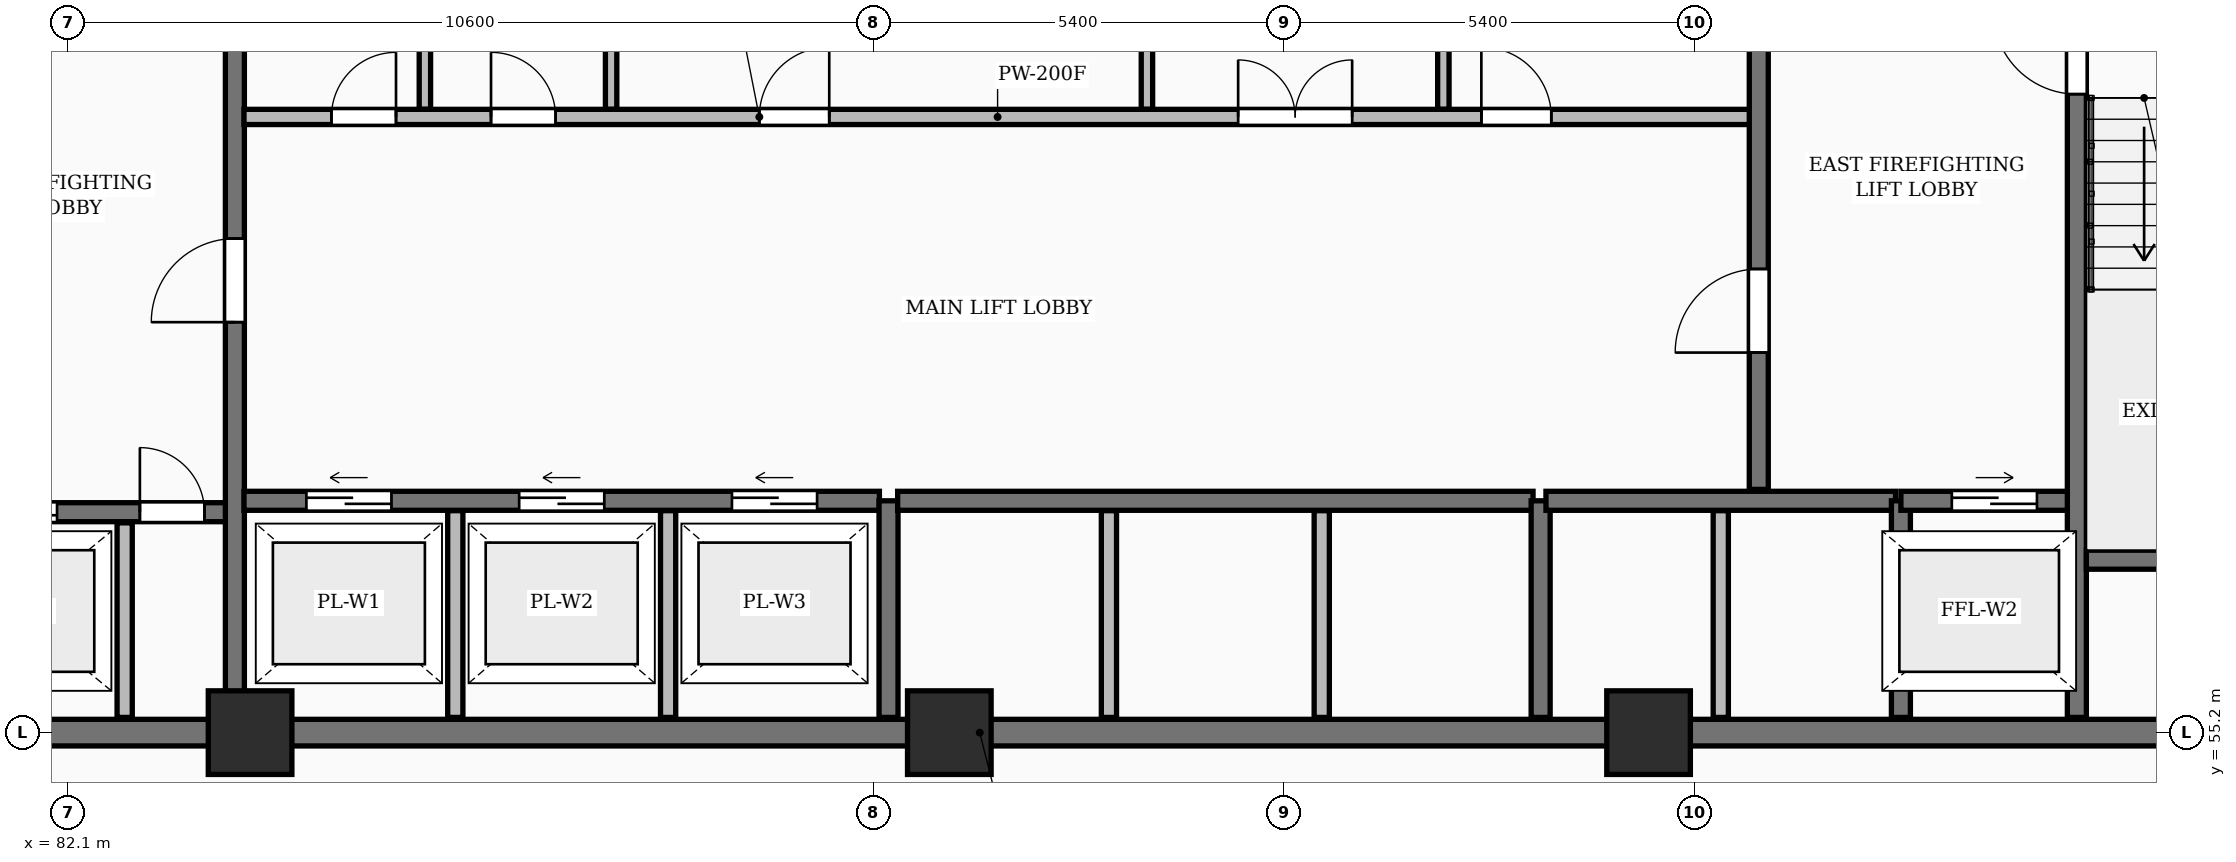
"""IFC4 building model, lengths in metres.
Left out: names, types, materials, properties, quantities, classifications, styles, units other than length and angle.
Written with IfcOpenShell. Run it as: python <this file> out.ifc"""

import sys

from ifc_helpers import new_model, si_unit, direction, frame, frame_2d, origin, origin_2d, place, context, subcontext, project, spatial, rectangle, extrude, element, fill, save


model = new_model("IFC4")
c1 = context("Model", 3, precision=1e-05, world=origin(), true_north=direction((0.0, 1.0)))
c2 = subcontext(c1, "Body", "Model", "MODEL_VIEW")
j1 = project(units=[si_unit("LENGTHUNIT", "METRE"), si_unit("PLANEANGLEUNIT", "RADIAN")], contexts=[c1])
p1 = place(None, origin())
s1 = spatial("IfcSite", under=j1, at=p1, CompositionType="ELEMENT")
p2 = place(p1, origin())
s2 = spatial("IfcBuilding", under=s1, at=p2, CompositionType="ELEMENT")
p3 = place(p2, frame((0.0, 0.0, -10.8)))
s3 = spatial("IfcBuildingStorey", under=s2, at=p3, CompositionType="ELEMENT", Elevation=-10.8)
for number, where, z_axis, x_axis in (
    (1, (84.5, 55.2, -0.45), (0.0, 0.0, 1.0), (1.0, 0.0, 0.0)),
    (2, (93.7, 55.2, -0.45), (0.0, 0.0, 1.0), (1.0, 0.0, 0.0)),
    (3, (102.9, 55.2, -0.45), (0.0, 0.0, 1.0), (1.0, 0.0, 0.0)),
):
    element("IfcColumn", number, at=place(p3, frame(where, z_axis=z_axis, x_axis=x_axis)), inside=s3, PredefinedType="COLUMN", context=c2, shape_type="SweptSolid", body=[
        extrude(rectangle(XDim=1.1, YDim=1.1, at=origin_2d()), origin(), (0.0, 0.0, 1.0), 4.05),
    ])
p4 = place(p3, frame((75.95, 55.2, 0.0), z_axis=(0.0, 0.0, 1.0), x_axis=(1.0, 0.0, 0.0)))
e4 = element("IfcWall", 4, at=p4, inside=s3, PredefinedType="SHEAR", context=c2, shape_type="SweptSolid", body=[
    extrude(rectangle(XDim=36.3, YDim=0.35, at=frame_2d((18.15, 0.0))), origin(), (0.0, 0.0, 1.0), 3.6),
])
p5 = place(p3, frame((79.79, 58.1, 0.0), z_axis=(0.0, 0.0, 1.0), x_axis=(1.0, 0.0, 0.0)))
e5 = element("IfcWall", 5, at=p5, inside=s3, PredefinedType="SHEAR", context=c2, shape_type="SweptSolid", body=[
    extrude(rectangle(XDim=4.39, YDim=0.25, at=frame_2d((2.195, 0.0))), origin(), (0.0, 0.0, 1.0), 3.6),
])
p6 = place(p5, frame((1.05, 0.0, 0.0)))
e6 = element("IfcOpeningElement", 6, at=p6, cuts=e5, PredefinedType="OPENING", context=c2, shape_type="SweptSolid", body=[
    extrude(rectangle(XDim=1.12, YDim=2.12, at=frame_2d((0.56, 1.06))), frame((0.0, 0.135, 0.0), z_axis=(0.0, -1.0, 0.0), x_axis=(1.0, 0.0, 0.0)), (0.0, 0.0, 1.0), 0.27),
])
p7 = place(p5, frame((3.26, 0.0, 0.0)))
e7 = element("IfcOpeningElement", 7, at=p7, cuts=e5, PredefinedType="OPENING", context=c2, shape_type="SweptSolid", body=[
    extrude(rectangle(XDim=0.85, YDim=2.05, at=frame_2d((0.425, 1.025))), frame((0.0, 0.135, 0.0), z_axis=(0.0, -1.0, 0.0), x_axis=(1.0, 0.0, 0.0)), (0.0, 0.0, 1.0), 0.27),
])
p8 = place(p3, frame((82.85, 55.4, 0.0), z_axis=(0.0, 0.0, 1.0), x_axis=(0.0, 1.0, 0.0)))
e8 = element("IfcWall", 8, at=p8, inside=s3, PredefinedType="PARTITIONING", context=c2, shape_type="SweptSolid", body=[
    extrude(rectangle(XDim=2.56, YDim=0.2, at=frame_2d((1.28, 0.0))), origin(), (0.0, 0.0, 1.0), 3.3),
])
p9 = place(p3, frame((84.3, 55.4, 0.0), z_axis=(0.0, 0.0, 1.0), x_axis=(0.0, 1.0, 0.0)))
e9 = element("IfcWall", 9, at=p9, inside=s3, PredefinedType="SHEAR", context=c2, shape_type="SweptSolid", body=[
    extrude(rectangle(XDim=11.6, YDim=0.25, at=frame_2d((5.8, 0.0))), origin(), (0.0, 0.0, 1.0), 3.6),
])
p10 = place(p9, frame((5.2, 0.0, 0.0)))
e10 = element("IfcOpeningElement", 10, at=p10, cuts=e9, PredefinedType="OPENING", context=c2, shape_type="SweptSolid", body=[
    extrude(rectangle(XDim=1.1, YDim=2.1, at=frame_2d((0.55, 1.05))), frame((0.0, 0.135, 0.0), z_axis=(0.0, -1.0, 0.0), x_axis=(1.0, 0.0, 0.0)), (0.0, 0.0, 1.0), 0.27),
])
for number, where, z_axis, x_axis in (
    (11, (87.2, 55.4, 0.0), (0.0, 0.0, 1.0), (0.0, 1.0, 0.0)),
    (12, (90.0, 55.4, 0.0), (0.0, 0.0, 1.0), (0.0, 1.0, 0.0)),
):
    element("IfcWall", number, at=place(p3, frame(where, z_axis=z_axis, x_axis=x_axis)), inside=s3, PredefinedType="PARTITIONING", context=c2, shape_type="SweptSolid", body=[
        extrude(rectangle(XDim=2.72, YDim=0.2, at=frame_2d((1.36, 0.0))), origin(), (0.0, 0.0, 1.0), 3.3),
    ])
p11 = place(p3, frame((84.42, 58.25, 0.0), z_axis=(0.0, 0.0, 1.0), x_axis=(1.0, 0.0, 0.0)))
e13 = element("IfcWall", 13, at=p11, inside=s3, PredefinedType="SHEAR", context=c2, shape_type="SweptSolid", body=[
    extrude(rectangle(XDim=8.36, YDim=0.25, at=frame_2d((4.18, 0.0))), origin(), (0.0, 0.0, 1.0), 3.6),
])
p12 = place(p11, frame((0.82, 0.0, 0.0)))
e14 = element("IfcOpeningElement", 14, at=p12, cuts=e13, PredefinedType="OPENING", context=c2, shape_type="SweptSolid", body=[
    extrude(rectangle(XDim=1.12, YDim=2.12, at=frame_2d((0.56, 1.06))), frame((0.0, 0.135, 0.0), z_axis=(0.0, -1.0, 0.0), x_axis=(1.0, 0.0, 0.0)), (0.0, 0.0, 1.0), 0.27),
])
p13 = place(p11, frame((3.62, 0.0, 0.0)))
e15 = element("IfcOpeningElement", 15, at=p13, cuts=e13, PredefinedType="OPENING", context=c2, shape_type="SweptSolid", body=[
    extrude(rectangle(XDim=1.12, YDim=2.12, at=frame_2d((0.56, 1.06))), frame((0.0, 0.135, 0.0), z_axis=(0.0, -1.0, 0.0), x_axis=(1.0, 0.0, 0.0)), (0.0, 0.0, 1.0), 0.27),
])
p14 = place(p11, frame((6.42, 0.0, 0.0)))
e16 = element("IfcOpeningElement", 16, at=p14, cuts=e13, PredefinedType="OPENING", context=c2, shape_type="SweptSolid", body=[
    extrude(rectangle(XDim=1.12, YDim=2.12, at=frame_2d((0.56, 1.06))), frame((0.0, 0.135, 0.0), z_axis=(0.0, -1.0, 0.0), x_axis=(1.0, 0.0, 0.0)), (0.0, 0.0, 1.0), 0.27),
])
p15 = place(p3, frame((92.9, 55.4, 0.0), z_axis=(0.0, 0.0, 1.0), x_axis=(0.0, 1.0, 0.0)))
e17 = element("IfcWall", 17, at=p15, inside=s3, PredefinedType="SHEAR", context=c2, shape_type="SweptSolid", body=[
    extrude(rectangle(XDim=2.85, YDim=0.25, at=frame_2d((1.425, 0.0))), origin(), (0.0, 0.0, 1.0), 3.6),
])
for number, where, z_axis, x_axis in (
    (18, (95.8, 55.4, 0.0), (0.0, 0.0, 1.0), (0.0, 1.0, 0.0)),
    (19, (98.6, 55.4, 0.0), (0.0, 0.0, 1.0), (0.0, 1.0, 0.0)),
):
    element("IfcWall", number, at=place(p3, frame(where, z_axis=z_axis, x_axis=x_axis)), inside=s3, PredefinedType="PARTITIONING", context=c2, shape_type="SweptSolid", body=[
        extrude(rectangle(XDim=2.72, YDim=0.2, at=frame_2d((1.36, 0.0))), origin(), (0.0, 0.0, 1.0), 3.3),
    ])
p16 = place(p3, frame((93.02, 58.25, 0.0), z_axis=(0.0, 0.0, 1.0), x_axis=(1.0, 0.0, 0.0)))
e20 = element("IfcWall", 20, at=p16, inside=s3, PredefinedType="SHEAR", context=c2, shape_type="SweptSolid", body=[
    extrude(rectangle(XDim=8.36, YDim=0.25, at=frame_2d((4.18, 0.0))), origin(), (0.0, 0.0, 1.0), 3.6),
])
p17 = place(p3, frame((101.48, 55.4, 0.0), z_axis=(0.0, 0.0, 1.0), x_axis=(0.0, 1.0, 0.0)))
e21 = element("IfcWall", 21, at=p17, inside=s3, PredefinedType="SHEAR", context=c2, shape_type="SweptSolid", body=[
    extrude(rectangle(XDim=2.85, YDim=0.25, at=frame_2d((1.425, 0.0))), origin(), (0.0, 0.0, 1.0), 3.6),
])
p18 = place(p3, frame((103.85, 55.4, 0.0), z_axis=(0.0, 0.0, 1.0), x_axis=(0.0, 1.0, 0.0)))
e22 = element("IfcWall", 22, at=p18, inside=s3, PredefinedType="PARTITIONING", context=c2, shape_type="SweptSolid", body=[
    extrude(rectangle(XDim=2.72, YDim=0.2, at=frame_2d((1.36, 0.0))), origin(), (0.0, 0.0, 1.0), 3.3),
])
p19 = place(p3, frame((101.55, 58.25, 0.0), z_axis=(0.0, 0.0, 1.0), x_axis=(1.0, 0.0, 0.0)))
e23 = element("IfcWall", 23, at=p19, inside=s3, PredefinedType="SHEAR", context=c2, shape_type="SweptSolid", body=[
    extrude(rectangle(XDim=4.6, YDim=0.25, at=frame_2d((2.3, 0.0))), origin(), (0.0, 0.0, 1.0), 3.6),
])
p20 = place(p3, frame((106.22, 55.4, 0.0), z_axis=(0.0, 0.0, 1.0), x_axis=(0.0, 1.0, 0.0)))
e24 = element("IfcWall", 24, at=p20, inside=s3, PredefinedType="SHEAR", context=c2, shape_type="SweptSolid", body=[
    extrude(rectangle(XDim=2.85, YDim=0.25, at=frame_2d((1.425, 0.0))), origin(), (0.0, 0.0, 1.0), 3.6),
])
p21 = place(p3, frame((106.22, 58.25, 0.0), z_axis=(0.0, 0.0, 1.0), x_axis=(1.0, 0.0, 0.0)))
e25 = element("IfcWall", 25, at=p21, inside=s3, PredefinedType="SHEAR", context=c2, shape_type="SweptSolid", body=[
    extrude(rectangle(XDim=2.46, YDim=0.25, at=frame_2d((1.23, 0.0))), origin(), (0.0, 0.0, 1.0), 3.6),
])
p22 = place(p21, frame((0.67, 0.0, 0.0)))
e26 = element("IfcOpeningElement", 26, at=p22, cuts=e25, PredefinedType="OPENING", context=c2, shape_type="SweptSolid", body=[
    extrude(rectangle(XDim=1.12, YDim=2.12, at=frame_2d((0.56, 1.06))), frame((0.0, 0.135, 0.0), z_axis=(0.0, -1.0, 0.0), x_axis=(1.0, 0.0, 0.0)), (0.0, 0.0, 1.0), 0.27),
])
for number, where, z_axis, x_axis in (
    (27, (86.8, 63.4, 0.0), (0.0, 0.0, 1.0), (0.0, 1.0, 0.0)),
    (28, (89.25, 63.4, 0.0), (0.0, 0.0, 1.0), (0.0, 1.0, 0.0)),
    (29, (96.3, 63.4, 0.0), (0.0, 0.0, 1.0), (0.0, 1.0, 0.0)),
    (30, (100.2, 63.4, 0.0), (0.0, 0.0, 1.0), (0.0, 1.0, 0.0)),
):
    element("IfcWall", number, at=place(p3, frame(where, z_axis=z_axis, x_axis=x_axis)), inside=s3, PredefinedType="PARTITIONING", context=c2, shape_type="SweptSolid", body=[
        extrude(rectangle(XDim=3.6, YDim=0.15, at=frame_2d((1.8, 0.0))), origin(), (0.0, 0.0, 1.0), 3.3),
    ])
p23 = place(p3, frame((84.42, 63.3, 0.0), z_axis=(0.0, 0.0, 1.0), x_axis=(1.0, 0.0, 0.0)))
e31 = element("IfcWall", 31, at=p23, inside=s3, PredefinedType="PARTITIONING", context=c2, shape_type="SweptSolid", body=[
    extrude(rectangle(XDim=19.83, YDim=0.2, at=frame_2d((9.915, 0.0))), origin(), (0.0, 0.0, 1.0), 3.3),
])
p24 = place(p23, frame((1.15, 0.0, 0.0)))
e32 = element("IfcOpeningElement", 32, at=p24, cuts=e31, PredefinedType="OPENING", context=c2, shape_type="SweptSolid", body=[
    extrude(rectangle(XDim=0.85, YDim=2.05, at=frame_2d((0.425, 1.025))), frame((0.0, 0.11, 0.0), z_axis=(0.0, -1.0, 0.0), x_axis=(1.0, 0.0, 0.0)), (0.0, 0.0, 1.0), 0.22),
])
p25 = place(p23, frame((3.25, 0.0, 0.0)))
e33 = element("IfcOpeningElement", 33, at=p25, cuts=e31, PredefinedType="OPENING", context=c2, shape_type="SweptSolid", body=[
    extrude(rectangle(XDim=0.85, YDim=2.05, at=frame_2d((0.425, 1.025))), frame((0.0, 0.11, 0.0), z_axis=(0.0, -1.0, 0.0), x_axis=(1.0, 0.0, 0.0)), (0.0, 0.0, 1.0), 0.22),
])
p26 = place(p23, frame((13.08, 0.0, 0.0)))
e34 = element("IfcOpeningElement", 34, at=p26, cuts=e31, PredefinedType="OPENING", context=c2, shape_type="SweptSolid", body=[
    extrude(rectangle(XDim=1.5, YDim=2.2, at=frame_2d((0.75, 1.1))), frame((0.0, 0.11, 0.0), z_axis=(0.0, -1.0, 0.0), x_axis=(1.0, 0.0, 0.0)), (0.0, 0.0, 1.0), 0.22),
])
p27 = place(p23, frame((6.78, 0.0, 0.0)))
e35 = element("IfcOpeningElement", 35, at=p27, cuts=e31, PredefinedType="OPENING", context=c2, shape_type="SweptSolid", body=[
    extrude(rectangle(XDim=0.92, YDim=2.08, at=frame_2d((0.46, 1.04))), frame((0.0, 0.11, 0.0), z_axis=(0.0, -1.0, 0.0), x_axis=(1.0, 0.0, 0.0)), (0.0, 0.0, 1.0), 0.22),
])
p28 = place(p23, frame((16.28, 0.0, 0.0)))
e36 = element("IfcOpeningElement", 36, at=p28, cuts=e31, PredefinedType="OPENING", context=c2, shape_type="SweptSolid", body=[
    extrude(rectangle(XDim=0.92, YDim=2.08, at=frame_2d((0.46, 1.04))), frame((0.0, 0.11, 0.0), z_axis=(0.0, -1.0, 0.0), x_axis=(1.0, 0.0, 0.0)), (0.0, 0.0, 1.0), 0.22),
])
p29 = place(p3, frame((104.35, 58.4, 0.0), z_axis=(0.0, 0.0, 1.0), x_axis=(0.0, 1.0, 0.0)))
e37 = element("IfcWall", 37, at=p29, inside=s3, PredefinedType="SHEAR", context=c2, shape_type="SweptSolid", body=[
    extrude(rectangle(XDim=8.6, YDim=0.25, at=frame_2d((4.3, 0.0))), origin(), (0.0, 0.0, 1.0), 3.6),
])
p30 = place(p29, frame((1.8, 0.0, 0.0)))
e38 = element("IfcOpeningElement", 38, at=p30, cuts=e37, PredefinedType="OPENING", context=c2, shape_type="SweptSolid", body=[
    extrude(rectangle(XDim=1.1, YDim=2.1, at=frame_2d((0.55, 1.05))), frame((0.0, 0.135, 0.0), z_axis=(0.0, -1.0, 0.0), x_axis=(1.0, 0.0, 0.0)), (0.0, 0.0, 1.0), 0.27),
])
p31 = place(p3, frame((108.535, 55.4, 0.0), z_axis=(0.0, 0.0, 1.0), x_axis=(0.0, 1.0, 0.0)))
e39 = element("IfcWall", 39, at=p31, inside=s3, PredefinedType="SHEAR", context=c2, shape_type="SweptSolid", body=[
    extrude(rectangle(XDim=11.6, YDim=0.25, at=frame_2d((5.8, 0.0))), origin(), (0.0, 0.0, 1.0), 3.6),
])
p32 = place(p31, frame((8.2, 0.0, 0.0)))
e40 = element("IfcOpeningElement", 40, at=p32, cuts=e39, PredefinedType="OPENING", context=c2, shape_type="SweptSolid", body=[
    extrude(rectangle(XDim=1.1, YDim=2.1, at=frame_2d((0.55, 1.05))), frame((0.0, 0.135, 0.0), z_axis=(0.0, -1.0, 0.0), x_axis=(1.0, 0.0, 0.0)), (0.0, 0.0, 1.0), 0.27),
])
p33 = place(p31, frame((10.25, 0.0, 0.0)))
e41 = element("IfcOpeningElement", 41, at=p33, cuts=e39, PredefinedType="OPENING", context=c2, shape_type="SweptSolid", body=[
    extrude(rectangle(XDim=0.85, YDim=2.05, at=frame_2d((0.425, 1.025))), frame((0.0, 0.135, 0.0), z_axis=(0.0, -1.0, 0.0), x_axis=(1.0, 0.0, 0.0)), (0.0, 0.0, 1.0), 0.27),
])
p34 = place(p3, frame((108.66, 57.475, 0.0), z_axis=(0.0, 0.0, 1.0), x_axis=(1.0, 0.0, 0.0)))
e42 = element("IfcWall", 42, at=p34, inside=s3, PredefinedType="SHEAR", context=c2, shape_type="SweptSolid", body=[
    extrude(rectangle(XDim=3.24, YDim=0.25, at=frame_2d((1.62, 0.0))), origin(), (0.0, 0.0, 1.0), 3.6),
])
p35 = place(p6, origin())
e43 = element("IfcDoor", 43, at=p35, inside=s3, OperationType="SLIDING_TO_LEFT", PredefinedType="DOOR", context=c2, shape_type="SweptSolid", body=[
    extrude(rectangle(XDim=1.12, YDim=2.12, at=frame_2d((0.56, 1.06))), frame((0.0, 0.025, 0.0), z_axis=(0.0, -1.0, 0.0), x_axis=(1.0, 0.0, 0.0)), (0.0, 0.0, 1.0), 0.05),
])
fill(e6, e43)
p36 = place(p7, origin())
e44 = element("IfcDoor", 44, at=p36, inside=s3, OperationType="SINGLE_SWING_LEFT", PredefinedType="DOOR", context=c2, shape_type="SweptSolid", body=[
    extrude(rectangle(XDim=0.85, YDim=2.05, at=frame_2d((0.425, 1.025))), frame((0.0, 0.025, 0.0), z_axis=(0.0, -1.0, 0.0), x_axis=(1.0, 0.0, 0.0)), (0.0, 0.0, 1.0), 0.05),
])
fill(e7, e44)
p37 = place(p10, origin())
e45 = element("IfcDoor", 45, at=p37, inside=s3, OperationType="SINGLE_SWING_LEFT", PredefinedType="DOOR", context=c2, shape_type="SweptSolid", body=[
    extrude(rectangle(XDim=1.1, YDim=2.1, at=frame_2d((0.55, 1.05))), frame((0.0, 0.025, 0.0), z_axis=(0.0, -1.0, 0.0), x_axis=(1.0, 0.0, 0.0)), (0.0, 0.0, 1.0), 0.05),
])
fill(e10, e45)
p38 = place(p12, origin())
e46 = element("IfcDoor", 46, at=p38, inside=s3, OperationType="SLIDING_TO_LEFT", PredefinedType="DOOR", context=c2, shape_type="SweptSolid", body=[
    extrude(rectangle(XDim=1.12, YDim=2.12, at=frame_2d((0.56, 1.06))), frame((0.0, 0.025, 0.0), z_axis=(0.0, -1.0, 0.0), x_axis=(1.0, 0.0, 0.0)), (0.0, 0.0, 1.0), 0.05),
])
fill(e14, e46)
p39 = place(p13, origin())
e47 = element("IfcDoor", 47, at=p39, inside=s3, OperationType="SLIDING_TO_LEFT", PredefinedType="DOOR", context=c2, shape_type="SweptSolid", body=[
    extrude(rectangle(XDim=1.12, YDim=2.12, at=frame_2d((0.56, 1.06))), frame((0.0, 0.025, 0.0), z_axis=(0.0, -1.0, 0.0), x_axis=(1.0, 0.0, 0.0)), (0.0, 0.0, 1.0), 0.05),
])
fill(e15, e47)
p40 = place(p14, origin())
e48 = element("IfcDoor", 48, at=p40, inside=s3, OperationType="SLIDING_TO_LEFT", PredefinedType="DOOR", context=c2, shape_type="SweptSolid", body=[
    extrude(rectangle(XDim=1.12, YDim=2.12, at=frame_2d((0.56, 1.06))), frame((0.0, 0.025, 0.0), z_axis=(0.0, -1.0, 0.0), x_axis=(1.0, 0.0, 0.0)), (0.0, 0.0, 1.0), 0.05),
])
fill(e16, e48)
p41 = place(p22, origin())
e49 = element("IfcDoor", 49, at=p41, inside=s3, OperationType="SLIDING_TO_RIGHT", PredefinedType="DOOR", context=c2, shape_type="SweptSolid", body=[
    extrude(rectangle(XDim=1.12, YDim=2.12, at=frame_2d((0.56, 1.06))), frame((0.0, 0.025, 0.0), z_axis=(0.0, -1.0, 0.0), x_axis=(1.0, 0.0, 0.0)), (0.0, 0.0, 1.0), 0.05),
])
fill(e26, e49)
p42 = place(p24, origin())
e50 = element("IfcDoor", 50, at=p42, inside=s3, OperationType="SINGLE_SWING_RIGHT", PredefinedType="DOOR", context=c2, shape_type="SweptSolid", body=[
    extrude(rectangle(XDim=0.85, YDim=2.05, at=frame_2d((0.425, 1.025))), frame((0.0, 0.025, 0.0), z_axis=(0.0, -1.0, 0.0), x_axis=(1.0, 0.0, 0.0)), (0.0, 0.0, 1.0), 0.05),
])
fill(e32, e50)
p43 = place(p25, origin())
e51 = element("IfcDoor", 51, at=p43, inside=s3, OperationType="SINGLE_SWING_LEFT", PredefinedType="DOOR", context=c2, shape_type="SweptSolid", body=[
    extrude(rectangle(XDim=0.85, YDim=2.05, at=frame_2d((0.425, 1.025))), frame((0.0, 0.025, 0.0), z_axis=(0.0, -1.0, 0.0), x_axis=(1.0, 0.0, 0.0)), (0.0, 0.0, 1.0), 0.05),
])
fill(e33, e51)
p44 = place(p26, origin())
e52 = element("IfcDoor", 52, at=p44, inside=s3, OperationType="DOUBLE_DOOR_SINGLE_SWING", PredefinedType="DOOR", context=c2, shape_type="SweptSolid", body=[
    extrude(rectangle(XDim=1.5, YDim=2.2, at=frame_2d((0.75, 1.1))), frame((0.0, 0.025, 0.0), z_axis=(0.0, -1.0, 0.0), x_axis=(1.0, 0.0, 0.0)), (0.0, 0.0, 1.0), 0.05),
])
fill(e34, e52)
p45 = place(p27, origin())
e53 = element("IfcDoor", 53, at=p45, inside=s3, OperationType="SINGLE_SWING_RIGHT", PredefinedType="DOOR", context=c2, shape_type="SweptSolid", body=[
    extrude(rectangle(XDim=0.92, YDim=2.08, at=frame_2d((0.46, 1.04))), frame((0.0, 0.025, 0.0), z_axis=(0.0, -1.0, 0.0), x_axis=(1.0, 0.0, 0.0)), (0.0, 0.0, 1.0), 0.05),
])
fill(e35, e53)
p46 = place(p28, origin())
e54 = element("IfcDoor", 54, at=p46, inside=s3, OperationType="SINGLE_SWING_LEFT", PredefinedType="DOOR", context=c2, shape_type="SweptSolid", body=[
    extrude(rectangle(XDim=0.92, YDim=2.08, at=frame_2d((0.46, 1.04))), frame((0.0, 0.025, 0.0), z_axis=(0.0, -1.0, 0.0), x_axis=(1.0, 0.0, 0.0)), (0.0, 0.0, 1.0), 0.05),
])
fill(e36, e54)
p47 = place(p30, origin())
e55 = element("IfcDoor", 55, at=p47, inside=s3, OperationType="SINGLE_SWING_LEFT", PredefinedType="DOOR", context=c2, shape_type="SweptSolid", body=[
    extrude(rectangle(XDim=1.1, YDim=2.1, at=frame_2d((0.55, 1.05))), frame((0.0, 0.025, 0.0), z_axis=(0.0, -1.0, 0.0), x_axis=(1.0, 0.0, 0.0)), (0.0, 0.0, 1.0), 0.05),
])
fill(e38, e55)
p48 = place(p32, origin())
e56 = element("IfcDoor", 56, at=p48, inside=s3, OperationType="SINGLE_SWING_RIGHT", PredefinedType="DOOR", context=c2, shape_type="SweptSolid", body=[
    extrude(rectangle(XDim=1.1, YDim=2.1, at=frame_2d((0.55, 1.05))), frame((0.0, 0.025, 0.0), z_axis=(0.0, -1.0, 0.0), x_axis=(1.0, 0.0, 0.0)), (0.0, 0.0, 1.0), 0.05),
])
fill(e40, e56)
save(model, sys.argv[1])
